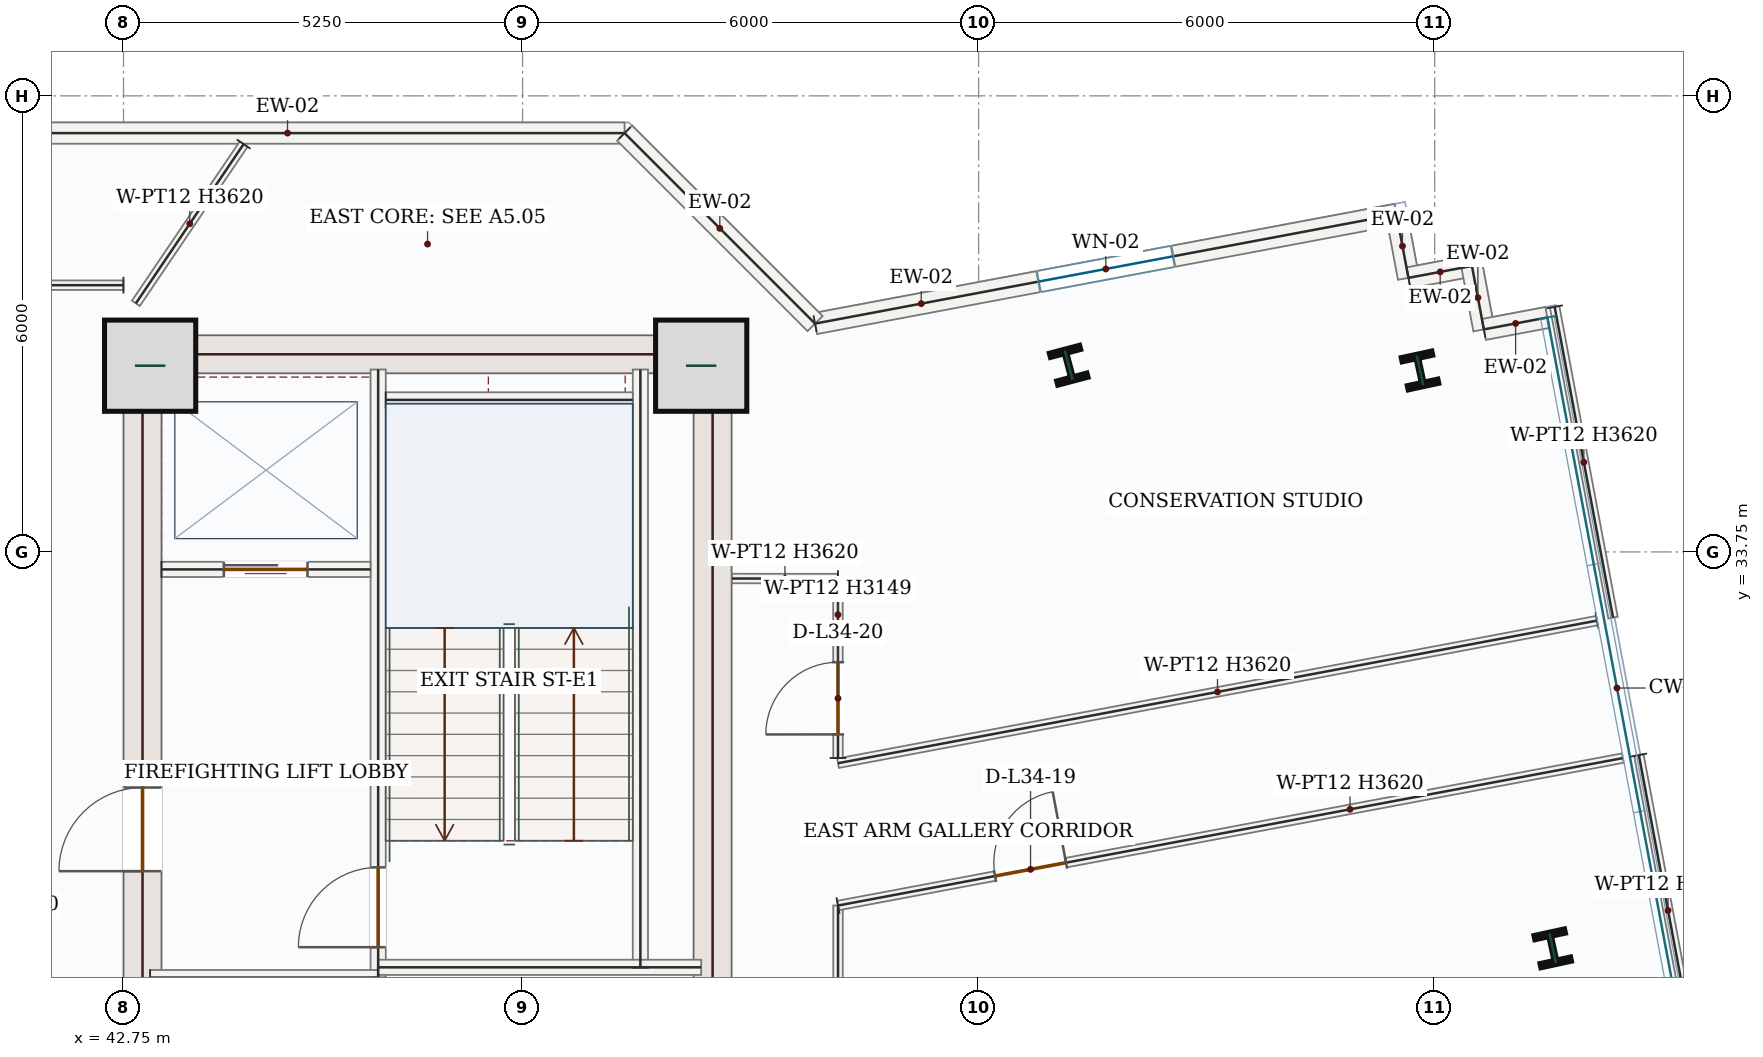
"""IFC4 building model, lengths in metres.
Left out: names, types, materials, properties, quantities, classifications, styles, units other than length and angle.
Written with IfcOpenShell. Run it as: python <this file> out.ifc"""

import sys

from ifc_helpers import new_model, si_unit, direction, frame, frame_2d, origin, origin_2d, place, context, subcontext, project, spatial, rectangle, i_section, extrude, source, transform, mapped, element, fill, save


model = new_model("IFC4")
c1 = context("Model", 3, precision=1e-05, world=origin(), true_north=direction((0.0, 1.0)))
c2 = subcontext(c1, "Body", "Model", "MODEL_VIEW")
j1 = project(units=[si_unit("LENGTHUNIT", "METRE"), si_unit("PLANEANGLEUNIT", "RADIAN")], contexts=[c1])
p1 = place(None, origin())
s1 = spatial("IfcSite", under=j1, at=p1, CompositionType="ELEMENT")
p2 = place(p1, origin())
s2 = spatial("IfcBuilding", under=s1, at=p2, CompositionType="ELEMENT")
p3 = place(p2, frame((0.0, 0.0, 151.2)))
s3 = spatial("IfcBuildingStorey", under=s2, at=p3, CompositionType="ELEMENT", Elevation=151.2)
p4 = place(p3, frame((43.0, 28.05, 0.0), z_axis=(0.0, 0.0, 1.0), x_axis=(0.0, 1.0, 0.0)))
e1 = element("IfcWall", 1, at=p4, inside=s3, PredefinedType="SHEAR", context=c2, shape_type="SweptSolid", body=[
    extrude(rectangle(XDim=8.55, YDim=0.5, at=frame_2d((4.275, 0.0))), origin(), (0.0, 0.0, 1.0), 3.62),
])
p5 = place(p4, frame((1.5, 0.0, 0.0)))
e2 = element("IfcOpeningElement", 2, at=p5, cuts=e1, PredefinedType="OPENING", context=c2, shape_type="SweptSolid", body=[
    extrude(rectangle(XDim=1.1, YDim=2.2, at=frame_2d((0.55, 1.1))), frame((0.0, 0.26, 0.0), z_axis=(0.0, -1.0, 0.0), x_axis=(1.0, 0.0, 0.0)), (0.0, 0.0, 1.0), 0.52),
])
m1 = source(origin(), c2, "Body", "SweptSolid", [
    extrude(rectangle(XDim=8.55, YDim=0.5, at=frame_2d((4.275, 0.0))), origin(), (0.0, 0.0, 1.0), 3.62),
])
p6 = place(p3, frame((50.5, 28.05, 0.0), z_axis=(0.0, 0.0, 1.0), x_axis=(0.0, 1.0, 0.0)))
e3 = element("IfcWall", 3, at=p6, inside=s3, PredefinedType="SHEAR", context=c2, shape_type="MappedRepresentation", body=[
    mapped(m1, transform((0.0, 0.0, 0.0), x_axis=(1.0, 0.0, 0.0), y_axis=(0.0, 1.0, 0.0), z_axis=(0.0, 0.0, 1.0), scale=1.0)),
])
m2 = source(origin(), c2, "Body", "SweptSolid", [
    extrude(rectangle(XDim=7.0, YDim=0.5, at=frame_2d((3.5, 0.0))), origin(), (0.0, 0.0, 1.0), 3.62),
])
p7 = place(p3, frame((43.25, 36.35, 0.0), z_axis=(0.0, 0.0, 1.0), x_axis=(1.0, 0.0, 0.0)))
e4 = element("IfcWall", 4, at=p7, inside=s3, PredefinedType="SHEAR", context=c2, shape_type="MappedRepresentation", body=[
    mapped(m2, transform((0.0, 0.0, 0.0), x_axis=(1.0, 0.0, 0.0), y_axis=(0.0, 1.0, 0.0), z_axis=(0.0, 0.0, 1.0), scale=1.0)),
])
m3 = source(origin(), c2, "Body", "SweptSolid", [
    extrude(rectangle(XDim=1.2, YDim=1.2, at=origin_2d()), origin(), (0.0, 0.0, 1.0), 3.9),
])
for number, where, z_axis, x_axis in (
    (5, (43.1, 36.2, 0.0), (0.0, 0.0, 1.0), (1.0, 0.0, 0.0)),
    (6, (50.35, 36.2, 0.0), (0.0, 0.0, 1.0), (1.0, 0.0, 0.0)),
):
    element("IfcColumn", number, at=place(p3, frame(where, z_axis=z_axis, x_axis=x_axis)), inside=s3, PredefinedType="COLUMN", context=c2, shape_type="MappedRepresentation", body=[
        mapped(m3, transform((0.0, 0.0, 0.0), x_axis=(1.0, 0.0, 0.0), y_axis=(0.0, 1.0, 0.0), z_axis=(0.0, 0.0, 1.0), scale=1.0)),
    ])
m4 = source(origin(), c2, "Body", "SweptSolid", [
    extrude(i_section(OverallWidth=0.412, OverallDepth=0.435, WebThickness=0.036, FlangeThickness=0.057, FilletRadius=0.018, at=origin_2d()), origin(), (0.0, 0.0, 1.0), 3.9),
])
for number, where, z_axis, x_axis in (
    (7, (55.185, 36.206, 0.0), (0.0, 0.0, 1.0), (0.967, 0.255, 0.0)),
    (8, (61.553, 28.535, 0.0), (0.0, 0.0, 1.0), (0.977, 0.211, 0.0)),
    (9, (59.807, 36.137, 0.0), (0.0, 0.0, 1.0), (0.977, 0.211, 0.0)),
):
    element("IfcColumn", number, at=place(p3, frame(where, z_axis=z_axis, x_axis=x_axis)), inside=s3, PredefinedType="COLUMN", context=c2, shape_type="MappedRepresentation", body=[
        mapped(m4, transform((0.0, 0.0, 0.0), x_axis=(1.0, 0.0, 0.0), y_axis=(0.0, 1.0, 0.0), z_axis=(0.0, 0.0, 1.0), scale=1.0)),
    ])
p8 = place(p3, frame((51.848, 36.754, 0.0), z_axis=(0.0, 0.0, 1.0), x_axis=(0.982809278234, 0.18462373254, 0.0)))
e10 = element("IfcWall", 10, at=p8, inside=s3, PredefinedType="SOLIDWALL", context=c2, shape_type="SweptSolid", body=[
    extrude(rectangle(XDim=7.783, YDim=0.28, at=frame_2d((3.892, 0.0))), origin(), (0.0, 0.0, 1.0), 3.62),
])
p9 = place(p8, frame((2.992, 0.0, 0.85)))
e11 = element("IfcOpeningElement", 11, at=p9, cuts=e10, PredefinedType="OPENING", context=c2, shape_type="SweptSolid", body=[
    extrude(rectangle(XDim=1.8, YDim=1.75, at=frame_2d((0.9, 0.875))), frame((0.0, 0.15, 0.0), z_axis=(0.0, -1.0, 0.0), x_axis=(1.0, 0.0, 0.0)), (0.0, 0.0, 1.0), 0.3),
])
m5 = source(origin(), c2, "Body", "SweptSolid", [
    extrude(rectangle(XDim=0.85, YDim=0.28, at=frame_2d((0.425, 0.0))), origin(), (0.0, 0.0, 1.0), 3.62),
])
p10 = place(p3, frame((59.498, 38.191, 0.0), z_axis=(0.0, 0.0, 1.0), x_axis=(0.184670010318, -0.982800583684, 0.0)))
e12 = element("IfcWall", 12, at=p10, inside=s3, PredefinedType="SOLIDWALL", context=c2, shape_type="MappedRepresentation", body=[
    mapped(m5, transform((0.0, 0.0, 0.0), x_axis=(1.0, 0.0, 0.0), y_axis=(0.0, 1.0, 0.0), z_axis=(0.0, 0.0, 1.0), scale=1.0)),
])
m6 = source(origin(), c2, "Body", "SweptSolid", [
    extrude(rectangle(XDim=0.85, YDim=0.28, at=frame_2d((0.425, 0.0))), origin(), (0.0, 0.0, 1.0), 3.62),
])
for number, where, z_axis, x_axis in (
    (13, (59.655, 37.355, 0.0), (0.0, 0.0, 1.0), (0.983, 0.185, 0.0)),
    (14, (60.49, 37.512, 0.0), (0.0, 0.0, 1.0), (0.185, -0.983, 0.0)),
):
    element("IfcWall", number, at=place(p3, frame(where, z_axis=z_axis, x_axis=x_axis)), inside=s3, PredefinedType="SOLIDWALL", context=c2, shape_type="MappedRepresentation", body=[
        mapped(m6, transform((0.0, 0.0, 0.0), x_axis=(1.0, 0.0, 0.0), y_axis=(0.0, 1.0, 0.0), z_axis=(0.0, 0.0, 1.0), scale=1.0)),
    ])
p11 = place(p3, frame((60.647, 36.677, 0.0), z_axis=(0.0, 0.0, 1.0), x_axis=(0.982852672425, 0.184392582027, 0.0)))
e15 = element("IfcWall", 15, at=p11, inside=s3, PredefinedType="SOLIDWALL", context=c2, shape_type="MappedRepresentation", body=[
    mapped(m5, transform((0.0, 0.0, 0.0), x_axis=(1.0, 0.0, 0.0), y_axis=(0.0, 1.0, 0.0), z_axis=(0.0, 0.0, 1.0), scale=1.0)),
])
m7 = source(origin(), c2, "Body", "SweptSolid", [
    extrude(rectangle(XDim=8.869, YDim=0.28, at=frame_2d((4.434, 0.0))), origin(), (0.0, 0.0, 1.0), 3.62),
])
p12 = place(p3, frame((40.473, 39.26, 0.0), z_axis=(0.0, 0.0, 1.0), x_axis=(1.0, 0.0, 0.0)))
e16 = element("IfcWall", 16, at=p12, inside=s3, PredefinedType="SOLIDWALL", context=c2, shape_type="MappedRepresentation", body=[
    mapped(m7, transform((0.0, 0.0, 0.0), x_axis=(1.0, 0.0, 0.0), y_axis=(0.0, 1.0, 0.0), z_axis=(0.0, 0.0, 1.0), scale=1.0)),
])
m8 = source(origin(), c2, "Body", "SweptSolid", [
    extrude(rectangle(XDim=3.544, YDim=0.28, at=frame_2d((1.772, 0.0))), origin(), (0.0, 0.0, 1.0), 3.62),
])
p13 = place(p3, frame((49.342, 39.26, 0.0), z_axis=(0.0, 0.0, 1.0), x_axis=(0.707106781187, -0.707106781187, 0.0)))
e17 = element("IfcWall", 17, at=p13, inside=s3, PredefinedType="SOLIDWALL", context=c2, shape_type="MappedRepresentation", body=[
    mapped(m8, transform((0.0, 0.0, 0.0), x_axis=(1.0, 0.0, 0.0), y_axis=(0.0, 1.0, 0.0), z_axis=(0.0, 0.0, 1.0), scale=1.0)),
])
m9 = source(origin(), c2, "Body", "SweptSolid", [
    extrude(rectangle(XDim=7.87, YDim=0.2, at=frame_2d((3.935, 0.0))), origin(), (0.0, 0.0, 1.0), 3.62),
])
p14 = place(p3, frame((49.55, 28.28, 0.0), z_axis=(0.0, 0.0, 1.0), x_axis=(0.0, 1.0, 0.0)))
e18 = element("IfcWall", 18, at=p14, inside=s3, PredefinedType="SOLIDWALL", context=c2, shape_type="MappedRepresentation", body=[
    mapped(m9, transform((0.0, 0.0, 0.0), x_axis=(1.0, 0.0, 0.0), y_axis=(0.0, 1.0, 0.0), z_axis=(0.0, 0.0, 1.0), scale=1.0)),
])
p15 = place(p3, frame((46.1, 28.15, 0.0), z_axis=(0.0, 0.0, 1.0), x_axis=(0.0, 1.0, 0.0)))
e19 = element("IfcWall", 19, at=p15, inside=s3, PredefinedType="SOLIDWALL", context=c2, shape_type="SweptSolid", body=[
    extrude(rectangle(XDim=8.0, YDim=0.2, at=frame_2d((4.0, 0.0))), origin(), (0.0, 0.0, 1.0), 3.62),
])
p16 = place(p15, frame((0.4, 0.0, 0.0)))
e20 = element("IfcOpeningElement", 20, at=p16, cuts=e19, PredefinedType="OPENING", context=c2, shape_type="SweptSolid", body=[
    extrude(rectangle(XDim=1.05, YDim=2.15, at=frame_2d((0.525, 1.075))), frame((0.0, 0.11, 0.0), z_axis=(0.0, -1.0, 0.0), x_axis=(1.0, 0.0, 0.0)), (0.0, 0.0, 1.0), 0.22),
])
m10 = source(origin(), c2, "Body", "SweptSolid", [
    extrude(rectangle(XDim=3.0, YDim=0.2, at=frame_2d((1.5, 0.0))), origin(), (0.0, 0.0, 1.0), 3.62),
])
p17 = place(p3, frame((43.1, 28.15, 0.0), z_axis=(0.0, 0.0, 1.0), x_axis=(1.0, 0.0, 0.0)))
e21 = element("IfcWall", 21, at=p17, inside=s3, PredefinedType="SOLIDWALL", context=c2, shape_type="MappedRepresentation", body=[
    mapped(m10, transform((0.0, 0.0, 0.0), x_axis=(1.0, 0.0, 0.0), y_axis=(0.0, 1.0, 0.0), z_axis=(0.0, 0.0, 1.0), scale=1.0)),
])
m11 = source(origin(), c2, "Body", "SweptSolid", [
    extrude(rectangle(XDim=4.25, YDim=0.2, at=frame_2d((2.125, 0.0))), origin(), (0.0, 0.0, 1.0), 3.62),
])
p18 = place(p3, frame((46.1, 28.285, 0.0), z_axis=(0.0, 0.0, 1.0), x_axis=(1.0, 0.0, 0.0)))
e22 = element("IfcWall", 22, at=p18, inside=s3, PredefinedType="SOLIDWALL", context=c2, shape_type="MappedRepresentation", body=[
    mapped(m11, transform((0.0, 0.0, 0.0), x_axis=(1.0, 0.0, 0.0), y_axis=(0.0, 1.0, 0.0), z_axis=(0.0, 0.0, 1.0), scale=1.0)),
])
m12 = source(origin(), c2, "Body", "SweptSolid", [
    extrude(rectangle(XDim=3.25, YDim=0.2, at=frame_2d((1.625, 0.0))), origin(), (0.0, 0.0, 1.0), 3.62),
])
p19 = place(p3, frame((46.2, 35.75, 0.0), z_axis=(0.0, 0.0, 1.0), x_axis=(1.0, 0.0, 0.0)))
e23 = element("IfcWall", 23, at=p19, inside=s3, PredefinedType="SOLIDWALL", context=c2, shape_type="MappedRepresentation", body=[
    mapped(m12, transform((0.0, 0.0, 0.0), x_axis=(1.0, 0.0, 0.0), y_axis=(0.0, 1.0, 0.0), z_axis=(0.0, 0.0, 1.0), scale=1.0)),
])
p20 = place(p3, frame((43.25, 33.52, 0.0), z_axis=(0.0, 0.0, 1.0), x_axis=(1.0, 0.0, 0.0)))
e24 = element("IfcWall", 24, at=p20, inside=s3, PredefinedType="SOLIDWALL", context=c2, shape_type="SweptSolid", body=[
    extrude(rectangle(XDim=2.75, YDim=0.2, at=frame_2d((1.375, 0.0))), origin(), (0.0, 0.0, 1.0), 3.62),
])
p21 = place(p20, frame((0.82, 0.0, 0.0)))
e25 = element("IfcOpeningElement", 25, at=p21, cuts=e24, PredefinedType="OPENING", context=c2, shape_type="SweptSolid", body=[
    extrude(rectangle(XDim=1.1, YDim=2.15, at=frame_2d((0.55, 1.075))), frame((0.0, 0.11, 0.0), z_axis=(0.0, -1.0, 0.0), x_axis=(1.0, 0.0, 0.0)), (0.0, 0.0, 1.0), 0.22),
])
p22 = place(p3, frame((42.749, 37.259, 0.0), z_axis=(0.0, 0.0, 1.0), x_axis=(-0.999999992041, 0.000126163065, 0.0)))
e26 = element("IfcWall", 26, at=p22, inside=s3, PredefinedType="PARTITIONING", context=c2, shape_type="SweptSolid", body=[
    extrude(rectangle(XDim=7.74, YDim=0.125, at=frame_2d((3.87, 0.0))), origin(), (0.0, 0.0, 1.0), 3.62),
])
p23 = place(p22, frame((5.296, 0.0, 0.0)))
e27 = element("IfcOpeningElement", 27, at=p23, cuts=e26, PredefinedType="OPENING", context=c2, shape_type="SweptSolid", body=[
    extrude(rectangle(XDim=0.95, YDim=2.15, at=frame_2d((0.475, 1.075))), frame((0.0, 0.073, 0.0), z_axis=(0.0, -1.0, 0.0), x_axis=(1.0, 0.0, 0.0)), (0.0, 0.0, 1.0), 0.145),
])
m13 = source(origin(), c2, "Body", "SweptSolid", [
    extrude(rectangle(XDim=2.53, YDim=0.125, at=frame_2d((1.265, 0.0))), origin(), (0.0, 0.0, 1.0), 3.62),
])
p24 = place(p3, frame((44.33, 39.115, 0.0), z_axis=(0.0, 0.0, 1.0), x_axis=(-0.560455418396, -0.82818459536, 0.0)))
e28 = element("IfcWall", 28, at=p24, inside=s3, PredefinedType="PARTITIONING", context=c2, shape_type="MappedRepresentation", body=[
    mapped(m13, transform((0.0, 0.0, 0.0), x_axis=(1.0, 0.0, 0.0), y_axis=(0.0, 1.0, 0.0), z_axis=(0.0, 0.0, 1.0), scale=1.0)),
])
m14 = source(origin(), c2, "Body", "SweptSolid", [
    extrude(rectangle(XDim=4.16, YDim=0.125, at=frame_2d((2.08, 0.0))), origin(), (0.0, 0.0, 1.0), 3.62),
])
p25 = place(p3, frame((62.686, 31.077, 0.0), z_axis=(0.0, 0.0, 1.0), x_axis=(0.184635785614, -0.982807013951, 0.0)))
e29 = element("IfcWall", 29, at=p25, inside=s3, PredefinedType="PARTITIONING", context=c2, shape_type="MappedRepresentation", body=[
    mapped(m14, transform((0.0, 0.0, 0.0), x_axis=(1.0, 0.0, 0.0), y_axis=(0.0, 1.0, 0.0), z_axis=(0.0, 0.0, 1.0), scale=1.0)),
])
m15 = source(origin(), c2, "Body", "SweptSolid", [
    extrude(rectangle(XDim=5.975, YDim=0.125, at=frame_2d((2.988, 0.0))), origin(), (0.0, 0.0, 1.0), 2.766),
])
p26 = place(p3, frame((52.15, 23.123, 0.0), z_axis=(0.0, 0.0, 1.0), x_axis=(0.0, 1.0, 0.0)))
e30 = element("IfcWall", 30, at=p26, inside=s3, PredefinedType="PARTITIONING", context=c2, shape_type="MappedRepresentation", body=[
    mapped(m15, transform((0.0, 0.0, 0.0), x_axis=(1.0, 0.0, 0.0), y_axis=(0.0, 1.0, 0.0), z_axis=(0.0, 0.0, 1.0), scale=1.0)),
])
p27 = place(p3, frame((52.15, 29.098, 0.0), z_axis=(0.0, 0.0, 1.0), x_axis=(0.982805559331, 0.184643528314, 0.0)))
e31 = element("IfcWall", 31, at=p27, inside=s3, PredefinedType="PARTITIONING", context=c2, shape_type="SweptSolid", body=[
    extrude(rectangle(XDim=10.505, YDim=0.125, at=frame_2d((5.252, 0.0))), origin(), (0.0, 0.0, 1.0), 3.62),
])
p28 = place(p27, frame((2.102, 0.0, 0.0)))
e32 = element("IfcOpeningElement", 32, at=p28, cuts=e31, PredefinedType="OPENING", context=c2, shape_type="SweptSolid", body=[
    extrude(rectangle(XDim=0.95, YDim=2.15, at=frame_2d((0.475, 1.075))), frame((0.0, 0.073, 0.0), z_axis=(0.0, -1.0, 0.0), x_axis=(1.0, 0.0, 0.0)), (0.0, 0.0, 1.0), 0.145),
])
p29 = place(p3, frame((61.578, 36.974, 0.0), z_axis=(0.0, 0.0, 1.0), x_axis=(0.184635785614, -0.982807013951, 0.0)))
e33 = element("IfcWall", 33, at=p29, inside=s3, PredefinedType="PARTITIONING", context=c2, shape_type="MappedRepresentation", body=[
    mapped(m14, transform((0.0, 0.0, 0.0), x_axis=(1.0, 0.0, 0.0), y_axis=(0.0, 1.0, 0.0), z_axis=(0.0, 0.0, 1.0), scale=1.0)),
])
m16 = source(origin(), c2, "Body", "SweptSolid", [
    extrude(rectangle(XDim=10.16, YDim=0.125, at=frame_2d((5.08, 0.0))), origin(), (0.0, 0.0, 1.0), 3.62),
])
p30 = place(p3, frame((62.135, 32.846, 0.0), z_axis=(0.0, 0.0, 1.0), x_axis=(-0.982809288671, -0.184623676981, 0.0)))
e34 = element("IfcWall", 34, at=p30, inside=s3, PredefinedType="PARTITIONING", context=c2, shape_type="MappedRepresentation", body=[
    mapped(m16, transform((0.0, 0.0, 0.0), x_axis=(1.0, 0.0, 0.0), y_axis=(0.0, 1.0, 0.0), z_axis=(0.0, 0.0, 1.0), scale=1.0)),
])
p31 = place(p3, frame((52.15, 31.039, 0.0), z_axis=(0.0, 0.0, 1.0), x_axis=(-0.0004137788, 0.999999914394, 0.0)))
e35 = element("IfcWall", 35, at=p31, inside=s3, PredefinedType="PARTITIONING", context=c2, shape_type="SweptSolid", body=[
    extrude(rectangle(XDim=2.36, YDim=0.125, at=frame_2d((1.18, 0.0))), origin(), (0.0, 0.0, 1.0), 3.149),
])
p32 = place(p31, frame((0.31, 0.0, 0.0)))
e36 = element("IfcOpeningElement", 36, at=p32, cuts=e35, PredefinedType="OPENING", context=c2, shape_type="SweptSolid", body=[
    extrude(rectangle(XDim=0.95, YDim=2.15, at=frame_2d((0.475, 1.075))), frame((0.0, 0.073, 0.0), z_axis=(0.0, -1.0, 0.0), x_axis=(1.0, 0.0, 0.0)), (0.0, 0.0, 1.0), 0.145),
])
m17 = source(origin(), c2, "Body", "SweptSolid", [
    extrude(rectangle(XDim=1.394, YDim=0.125, at=frame_2d((0.697, 0.0))), origin(), (0.0, 0.0, 1.0), 3.62),
])
p33 = place(p3, frame((52.149, 33.399, 0.0), z_axis=(0.0, 0.0, 1.0), x_axis=(-0.999999754632, 0.000700525222, 0.0)))
e37 = element("IfcWall", 37, at=p33, inside=s3, PredefinedType="PARTITIONING", context=c2, shape_type="MappedRepresentation", body=[
    mapped(m17, transform((0.0, 0.0, 0.0), x_axis=(1.0, 0.0, 0.0), y_axis=(0.0, 1.0, 0.0), z_axis=(0.0, 0.0, 1.0), scale=1.0)),
])
m18 = source(origin(), c2, "Body", "SweptSolid", [
    extrude(rectangle(XDim=1.8, YDim=1.75, at=frame_2d((0.9, 0.875))), frame((0.0, 0.03, 0.0), z_axis=(0.0, -1.0, 0.0), x_axis=(1.0, 0.0, 0.0)), (0.0, 0.0, 1.0), 0.06),
])
p34 = place(p9, origin())
e38 = element("IfcWindow", 38, at=p34, inside=s3, PartitioningType="DOUBLE_PANEL_VERTICAL", PredefinedType="WINDOW", context=c2, shape_type="MappedRepresentation", body=[
    mapped(m18, transform((0.0, 0.0, 0.0), x_axis=(1.0, 0.0, 0.0), y_axis=(0.0, 1.0, 0.0), z_axis=(0.0, 0.0, 1.0), scale=1.0)),
])
fill(e11, e38)
m19 = source(origin(), c2, "Body", "SweptSolid", [
    extrude(rectangle(XDim=1.05, YDim=2.15, at=frame_2d((0.525, 1.075))), frame((0.0, 0.025, 0.0), z_axis=(0.0, -1.0, 0.0), x_axis=(1.0, 0.0, 0.0)), (0.0, 0.0, 1.0), 0.05),
])
p35 = place(p16, origin())
e39 = element("IfcDoor", 39, at=p35, inside=s3, OperationType="SINGLE_SWING_LEFT", PredefinedType="DOOR", context=c2, shape_type="MappedRepresentation", body=[
    mapped(m19, transform((0.0, 0.0, 0.0), x_axis=(1.0, 0.0, 0.0), y_axis=(0.0, 1.0, 0.0), z_axis=(0.0, 0.0, 1.0), scale=1.0)),
])
fill(e20, e39)
m20 = source(origin(), c2, "Body", "SweptSolid", [
    extrude(rectangle(XDim=1.1, YDim=2.15, at=frame_2d((0.55, 1.075))), frame((0.0, 0.025, 0.0), z_axis=(0.0, -1.0, 0.0), x_axis=(1.0, 0.0, 0.0)), (0.0, 0.0, 1.0), 0.05),
])
p36 = place(p21, origin())
e40 = element("IfcDoor", 40, at=p36, inside=s3, OperationType="DOUBLE_DOOR_SLIDING", PredefinedType="DOOR", context=c2, shape_type="MappedRepresentation", body=[
    mapped(m20, transform((0.0, 0.0, 0.0), x_axis=(1.0, 0.0, 0.0), y_axis=(0.0, 1.0, 0.0), z_axis=(0.0, 0.0, 1.0), scale=1.0)),
])
fill(e25, e40)
m21 = source(origin(), c2, "Body", "SweptSolid", [
    extrude(rectangle(XDim=1.1, YDim=2.2, at=frame_2d((0.55, 1.1))), frame((0.0, 0.025, 0.0), z_axis=(0.0, -1.0, 0.0), x_axis=(1.0, 0.0, 0.0)), (0.0, 0.0, 1.0), 0.05),
])
p37 = place(p5, origin())
e41 = element("IfcDoor", 41, at=p37, inside=s3, OperationType="SINGLE_SWING_LEFT", PredefinedType="DOOR", context=c2, shape_type="MappedRepresentation", body=[
    mapped(m21, transform((0.0, 0.0, 0.0), x_axis=(1.0, 0.0, 0.0), y_axis=(0.0, 1.0, 0.0), z_axis=(0.0, 0.0, 1.0), scale=1.0)),
])
fill(e2, e41)
m22 = source(origin(), c2, "Body", "SweptSolid", [
    extrude(rectangle(XDim=0.95, YDim=2.15, at=frame_2d((0.475, 1.075))), frame((0.0, 0.025, 0.0), z_axis=(0.0, -1.0, 0.0), x_axis=(1.0, 0.0, 0.0)), (0.0, 0.0, 1.0), 0.05),
])
p38 = place(p28, origin())
e42 = element("IfcDoor", 42, at=p38, inside=s3, OperationType="SINGLE_SWING_RIGHT", PredefinedType="DOOR", context=c2, shape_type="MappedRepresentation", body=[
    mapped(m22, transform((0.0, 0.0, 0.0), x_axis=(1.0, 0.0, 0.0), y_axis=(0.0, 1.0, 0.0), z_axis=(0.0, 0.0, 1.0), scale=1.0)),
])
fill(e32, e42)
p39 = place(p32, origin())
e43 = element("IfcDoor", 43, at=p39, inside=s3, OperationType="SINGLE_SWING_LEFT", PredefinedType="DOOR", context=c2, shape_type="MappedRepresentation", body=[
    mapped(m22, transform((0.0, 0.0, 0.0), x_axis=(1.0, 0.0, 0.0), y_axis=(0.0, 1.0, 0.0), z_axis=(0.0, 0.0, 1.0), scale=1.0)),
])
fill(e36, e43)
save(model, sys.argv[1])
